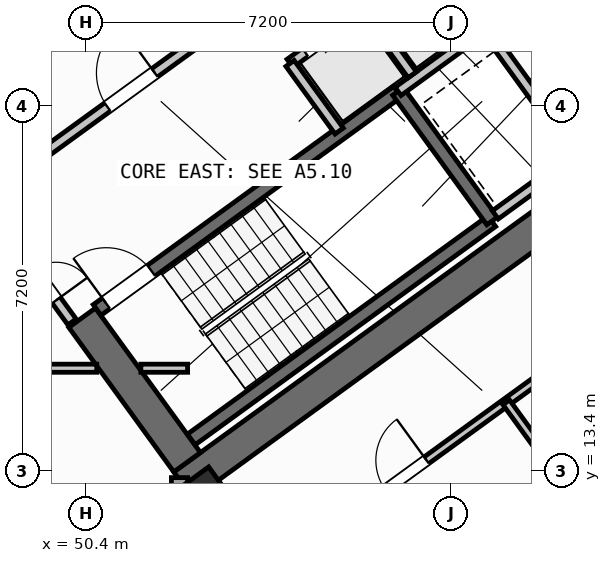
"""IFC4 building model, lengths in metres.
Left out: names, types, materials, properties, quantities, classifications, styles, units other than length and angle.
Written with IfcOpenShell. Run it as: python <this file> out.ifc"""

import sys

from ifc_helpers import new_model, si_unit, direction, frame, frame_2d, origin, origin_2d, place, context, subcontext, project, spatial, rectangle, hollow_rectangle, extrude, source, transform, mapped, element, fill, save


model = new_model("IFC4")
c1 = context("Model", 3, precision=1e-05, world=origin(), true_north=direction((0.0, 1.0)))
c2 = subcontext(c1, "Body", "Model", "MODEL_VIEW")
j1 = project(units=[si_unit("LENGTHUNIT", "METRE"), si_unit("PLANEANGLEUNIT", "RADIAN")], contexts=[c1])
p1 = place(None, origin())
s1 = spatial("IfcSite", under=j1, at=p1, CompositionType="ELEMENT")
p2 = place(p1, origin())
s2 = spatial("IfcBuilding", under=s1, at=p2, CompositionType="ELEMENT")
p3 = place(p2, frame((0.0, 0.0, 60.0)))
s3 = spatial("IfcBuildingStorey", under=s2, at=p3, CompositionType="ELEMENT", Elevation=60.0)
p4 = place(p3, frame((52.318, 13.11, 0.0), z_axis=(0.0, 0.0, 1.0), x_axis=(0.809019445368, 0.587781878776, 0.0)))
e1 = element("IfcWall", 1, at=p4, inside=s3, PredefinedType="SHEAR", context=c2, shape_type="SweptSolid", body=[
    extrude(rectangle(XDim=12.44, YDim=0.65, at=frame_2d((6.22, 0.0))), origin(), (0.0, 0.0, 1.0), 3.35),
])
p5 = place(p3, frame((52.39, 13.564, 0.0), z_axis=(0.0, 0.0, 1.0), x_axis=(-0.58779688989, 0.809008539037, 0.0)))
e2 = element("IfcWall", 2, at=p5, inside=s3, PredefinedType="SHEAR", context=c2, shape_type="SweptSolid", body=[
    extrude(rectangle(XDim=3.525, YDim=0.65, at=frame_2d((1.763, 0.0))), origin(), (0.0, 0.0, 1.0), 3.35),
])
m1 = source(origin(), c2, "Body", "SweptSolid", [
    extrude(hollow_rectangle(XDim=1.0, YDim=1.0, WallThickness=0.04, at=origin_2d()), origin(), (0.0, 0.0, 1.0), 3.6),
])
p6 = place(p3, frame((52.705, 12.773, 0.0), z_axis=(0.0, 0.0, 1.0), x_axis=(0.809016994375, 0.587785252292, 0.0)))
e3 = element("IfcColumn", 3, at=p6, inside=s3, PredefinedType="COLUMN", context=c2, shape_type="MappedRepresentation", body=[
    mapped(m1, transform((0.0, 0.0, 0.0), scale=1.0)),
])
p7 = place(p3, frame((58.455, 35.484, 0.0), z_axis=(0.0, 0.0, 1.0), x_axis=(0.587783625747, -0.809018176127, 0.0)))
e4 = element("IfcWall", 4, at=p7, inside=s3, PredefinedType="STANDARD", context=c2, shape_type="SweptSolid", body=[
    extrude(rectangle(XDim=21.587, YDim=0.32, at=frame_2d((10.794, 0.0))), origin(), (0.0, 0.0, 1.0), 2.725),
])
p8 = place(p7, frame((1.54, 0.0, 0.85)))
e5 = element("IfcOpeningElement", 5, at=p8, cuts=e4, PredefinedType="OPENING", context=c2, shape_type="SweptSolid", body=[
    extrude(rectangle(XDim=1.5, YDim=1.5, at=frame_2d((0.75, 0.75))), frame((0.0, 0.17, 0.0), z_axis=(0.0, -1.0, 0.0), x_axis=(1.0, 0.0, 0.0)), (0.0, 0.0, 1.0), 0.34),
])
p9 = place(p7, frame((4.695, 0.0, 0.85)))
e6 = element("IfcOpeningElement", 6, at=p9, cuts=e4, PredefinedType="OPENING", context=c2, shape_type="SweptSolid", body=[
    extrude(rectangle(XDim=1.8, YDim=1.5, at=frame_2d((0.9, 0.75))), frame((0.0, 0.17, 0.0), z_axis=(0.0, -1.0, 0.0), x_axis=(1.0, 0.0, 0.0)), (0.0, 0.0, 1.0), 0.34),
])
p10 = place(p7, frame((13.009, 0.0, 1.0)))
e7 = element("IfcOpeningElement", 7, at=p10, cuts=e4, PredefinedType="OPENING", context=c2, shape_type="SweptSolid", body=[
    extrude(rectangle(XDim=0.9, YDim=1.25, at=frame_2d((0.45, 0.625))), frame((0.0, 0.17, 0.0), z_axis=(0.0, -1.0, 0.0), x_axis=(1.0, 0.0, 0.0)), (0.0, 0.0, 1.0), 0.34),
])
p11 = place(p7, frame((16.092, 0.0, 0.95)))
e8 = element("IfcOpeningElement", 8, at=p11, cuts=e4, PredefinedType="OPENING", context=c2, shape_type="SweptSolid", body=[
    extrude(rectangle(XDim=1.2, YDim=1.4, at=frame_2d((0.6, 0.7))), frame((0.0, 0.17, 0.0), z_axis=(0.0, -1.0, 0.0), x_axis=(1.0, 0.0, 0.0)), (0.0, 0.0, 1.0), 0.34),
])
p12 = place(p7, frame((19.085, 0.0, 1.0)))
e9 = element("IfcOpeningElement", 9, at=p12, cuts=e4, PredefinedType="OPENING", context=c2, shape_type="SweptSolid", body=[
    extrude(rectangle(XDim=0.9, YDim=1.25, at=frame_2d((0.45, 0.625))), frame((0.0, 0.17, 0.0), z_axis=(0.0, -1.0, 0.0), x_axis=(1.0, 0.0, 0.0)), (0.0, 0.0, 1.0), 0.34),
])
p13 = place(p3, frame((71.098, 17.731, 0.0), z_axis=(0.0, 0.0, 1.0), x_axis=(-0.809021120468, -0.587779573171, 0.0)))
e10 = element("IfcWall", 10, at=p13, inside=s3, PredefinedType="STANDARD", context=c2, shape_type="SweptSolid", body=[
    extrude(rectangle(XDim=17.588, YDim=0.32, at=frame_2d((8.794, 0.0))), origin(), (0.0, 0.0, 1.0), 3.35),
])
p14 = place(p13, frame((1.624, 0.0, 0.0)))
e11 = element("IfcOpeningElement", 11, at=p14, cuts=e10, PredefinedType="OPENING", context=c2, shape_type="SweptSolid", body=[
    extrude(rectangle(XDim=1.05, YDim=2.15, at=frame_2d((0.525, 1.075))), frame((0.0, 0.17, 0.0), z_axis=(0.0, -1.0, 0.0), x_axis=(1.0, 0.0, 0.0)), (0.0, 0.0, 1.0), 0.34),
])
p15 = place(p13, frame((4.104, 0.0, 1.0)))
e12 = element("IfcOpeningElement", 12, at=p15, cuts=e10, PredefinedType="OPENING", context=c2, shape_type="SweptSolid", body=[
    extrude(rectangle(XDim=0.9, YDim=1.25, at=frame_2d((0.45, 0.625))), frame((0.0, 0.17, 0.0), z_axis=(0.0, -1.0, 0.0), x_axis=(1.0, 0.0, 0.0)), (0.0, 0.0, 1.0), 0.34),
])
p16 = place(p13, frame((7.879, 0.0, 0.85)))
e13 = element("IfcOpeningElement", 13, at=p16, cuts=e10, PredefinedType="OPENING", context=c2, shape_type="SweptSolid", body=[
    extrude(rectangle(XDim=1.8, YDim=1.5, at=frame_2d((0.9, 0.75))), frame((0.0, 0.17, 0.0), z_axis=(0.0, -1.0, 0.0), x_axis=(1.0, 0.0, 0.0)), (0.0, 0.0, 1.0), 0.34),
])
p17 = place(p13, frame((13.529, 0.0, 0.85)))
e14 = element("IfcOpeningElement", 14, at=p17, cuts=e10, PredefinedType="OPENING", context=c2, shape_type="SweptSolid", body=[
    extrude(rectangle(XDim=1.5, YDim=1.5, at=frame_2d((0.75, 0.75))), frame((0.0, 0.17, 0.0), z_axis=(0.0, -1.0, 0.0), x_axis=(1.0, 0.0, 0.0)), (0.0, 0.0, 1.0), 0.34),
])
p18 = place(p3, frame((52.24, 13.261, 0.0), z_axis=(0.0, 0.0, 1.0), x_axis=(0.0, -1.0, 0.0)))
e15 = element("IfcWall", 15, at=p18, inside=s3, PredefinedType="STANDARD", context=c2, shape_type="SweptSolid", body=[
    extrude(rectangle(XDim=9.795, YDim=0.32, at=frame_2d((4.897, 0.0))), origin(), (0.0, 0.0, 1.0), 3.35),
])
p19 = place(p18, frame((2.199, 0.0, 0.8)))
e16 = element("IfcOpeningElement", 16, at=p19, cuts=e15, PredefinedType="OPENING", context=c2, shape_type="SweptSolid", body=[
    extrude(rectangle(XDim=2.1, YDim=1.55, at=frame_2d((1.05, 0.775))), frame((0.0, 0.17, 0.0), z_axis=(0.0, -1.0, 0.0), x_axis=(1.0, 0.0, 0.0)), (0.0, 0.0, 1.0), 0.34),
])
p20 = place(p18, frame((6.88, 0.0, 0.85)))
e17 = element("IfcOpeningElement", 17, at=p20, cuts=e15, PredefinedType="OPENING", context=c2, shape_type="SweptSolid", body=[
    extrude(rectangle(XDim=1.8, YDim=1.5, at=frame_2d((0.9, 0.75))), frame((0.0, 0.17, 0.0), z_axis=(0.0, -1.0, 0.0), x_axis=(1.0, 0.0, 0.0)), (0.0, 0.0, 1.0), 0.34),
])
p21 = place(p3, frame((52.472, 14.013, 0.0), z_axis=(0.0, 0.0, 1.0), x_axis=(0.809028366311, 0.587769599847, 0.0)))
e18 = element("IfcWall", 18, at=p21, inside=s3, PredefinedType="SHEAR", context=c2, shape_type="SweptSolid", body=[
    extrude(rectangle(XDim=7.33, YDim=0.26, at=frame_2d((3.665, 0.0))), origin(), (0.0, 0.0, 1.0), 3.35),
])
p22 = place(p3, frame((50.615, 16.57, 0.0), z_axis=(0.0, 0.0, 1.0), x_axis=(0.809028366311, 0.587769599847, 0.0)))
e19 = element("IfcWall", 19, at=p22, inside=s3, PredefinedType="SHEAR", context=c2, shape_type="SweptSolid", body=[
    extrude(rectangle(XDim=7.33, YDim=0.26, at=frame_2d((3.665, 0.0))), origin(), (0.0, 0.0, 1.0), 3.35),
])
p23 = place(p22, frame((0.22, 0.0, 0.0)))
e20 = element("IfcOpeningElement", 20, at=p23, cuts=e19, PredefinedType="OPENING", context=c2, shape_type="SweptSolid", body=[
    extrude(rectangle(XDim=1.1, YDim=2.1, at=frame_2d((0.55, 1.05))), frame((0.0, 0.14, 0.0), z_axis=(0.0, -1.0, 0.0), x_axis=(1.0, 0.0, 0.0)), (0.0, 0.0, 1.0), 0.28),
])
p24 = place(p3, frame((58.41, 18.327, 0.0), z_axis=(0.0, 0.0, 1.0), x_axis=(-0.58776738483, 0.809029975545, 0.0)))
e21 = element("IfcWall", 21, at=p24, inside=s3, PredefinedType="SHEAR", context=c2, shape_type="SweptSolid", body=[
    extrude(rectangle(XDim=3.16, YDim=0.26, at=frame_2d((1.58, 0.0))), origin(), (0.0, 0.0, 1.0), 3.35),
])
p25 = place(p3, frame((47.106, 21.437, 0.0), z_axis=(0.0, 0.0, 1.0), x_axis=(0.809012514015, 0.58779141893, 0.0)))
e22 = element("IfcWall", 22, at=p25, inside=s3, PredefinedType="STANDARD", context=c2, shape_type="SweptSolid", body=[
    extrude(rectangle(XDim=3.398, YDim=0.2, at=frame_2d((1.699, 0.0))), origin(), (0.0, 0.0, 1.0), 3.34),
])
p26 = place(p25, frame((0.408, 0.0, 0.0)))
e23 = element("IfcOpeningElement", 23, at=p26, cuts=e22, PredefinedType="OPENING", context=c2, shape_type="SweptSolid", body=[
    extrude(rectangle(XDim=1.3, YDim=2.2, at=frame_2d((0.65, 1.1))), frame((0.0, 0.11, 0.0), z_axis=(0.0, -1.0, 0.0), x_axis=(1.0, 0.0, 0.0)), (0.0, 0.0, 1.0), 0.22),
])
p27 = place(p3, frame((48.799, 19.107, 0.0), z_axis=(0.0, 0.0, 1.0), x_axis=(0.809012959416, 0.587790805897, 0.0)))
e24 = element("IfcWall", 24, at=p27, inside=s3, PredefinedType="STANDARD", context=c2, shape_type="SweptSolid", body=[
    extrude(rectangle(XDim=5.718, YDim=0.2, at=frame_2d((2.859, 0.0))), origin(), (0.0, 0.0, 1.0), 3.34),
])
p28 = place(p27, frame((2.498, 0.0, 0.0)))
e25 = element("IfcOpeningElement", 25, at=p28, cuts=e24, PredefinedType="OPENING", context=c2, shape_type="SweptSolid", body=[
    extrude(rectangle(XDim=1.15, YDim=2.1, at=frame_2d((0.575, 1.05))), frame((0.0, 0.11, 0.0), z_axis=(0.0, -1.0, 0.0), x_axis=(1.0, 0.0, 0.0)), (0.0, 0.0, 1.0), 0.22),
])
p29 = place(p3, frame((56.553, 20.884, 0.0), z_axis=(0.0, 0.0, 1.0), x_axis=(0.809035789462, 0.587759382205, 0.0)))
e26 = element("IfcWall", 26, at=p29, inside=s3, PredefinedType="STANDARD", context=c2, shape_type="SweptSolid", body=[
    extrude(rectangle(XDim=3.768, YDim=0.2, at=frame_2d((1.884, 0.0))), origin(), (0.0, 0.0, 1.0), 3.34),
])
p30 = place(p29, frame((2.65, 0.0, 0.0)))
e27 = element("IfcOpeningElement", 27, at=p30, cuts=e26, PredefinedType="OPENING", context=c2, shape_type="SweptSolid", body=[
    extrude(rectangle(XDim=0.86, YDim=2.05, at=frame_2d((0.43, 1.025))), frame((0.0, 0.11, 0.0), z_axis=(0.0, -1.0, 0.0), x_axis=(1.0, 0.0, 0.0)), (0.0, 0.0, 1.0), 0.22),
])
p31 = place(p3, frame((54.421, 21.436, 0.0), z_axis=(0.0, 0.0, 1.0), x_axis=(0.809013710463, 0.587789772183, 0.0)))
e28 = element("IfcWall", 28, at=p31, inside=s3, PredefinedType="STANDARD", context=c2, shape_type="SweptSolid", body=[
    extrude(rectangle(XDim=5.36, YDim=0.2, at=frame_2d((2.68, 0.0))), origin(), (0.0, 0.0, 1.0), 3.34),
])
p32 = place(p31, frame((0.37, 0.0, 0.0)))
e29 = element("IfcOpeningElement", 29, at=p32, cuts=e28, PredefinedType="OPENING", context=c2, shape_type="SweptSolid", body=[
    extrude(rectangle(XDim=1.1, YDim=2.15, at=frame_2d((0.55, 1.075))), frame((0.0, 0.11, 0.0), z_axis=(0.0, -1.0, 0.0), x_axis=(1.0, 0.0, 0.0)), (0.0, 0.0, 1.0), 0.22),
])
p33 = place(p31, frame((2.17, 0.0, 0.0)))
e30 = element("IfcOpeningElement", 30, at=p33, cuts=e28, PredefinedType="OPENING", context=c2, shape_type="SweptSolid", body=[
    extrude(rectangle(XDim=1.1, YDim=2.15, at=frame_2d((0.55, 1.075))), frame((0.0, 0.11, 0.0), z_axis=(0.0, -1.0, 0.0), x_axis=(1.0, 0.0, 0.0)), (0.0, 0.0, 1.0), 0.22),
])
p34 = place(p31, frame((3.97, 0.0, 0.0)))
e31 = element("IfcOpeningElement", 31, at=p34, cuts=e28, PredefinedType="OPENING", context=c2, shape_type="SweptSolid", body=[
    extrude(rectangle(XDim=1.1, YDim=2.15, at=frame_2d((0.55, 1.075))), frame((0.0, 0.11, 0.0), z_axis=(0.0, -1.0, 0.0), x_axis=(1.0, 0.0, 0.0)), (0.0, 0.0, 1.0), 0.22),
])
p35 = place(p3, frame((55.391, 20.102, 0.0), z_axis=(0.0, 0.0, 1.0), x_axis=(-0.58778447739, 0.809017557374, 0.0)))
e32 = element("IfcWall", 32, at=p35, inside=s3, PredefinedType="STANDARD", context=c2, shape_type="SweptSolid", body=[
    extrude(rectangle(XDim=1.65, YDim=0.2, at=frame_2d((0.825, 0.0))), origin(), (0.0, 0.0, 1.0), 3.34),
])
p36 = place(p3, frame((56.834, 21.212, 0.0), z_axis=(0.0, 0.0, 1.0), x_axis=(-0.58776738483, 0.809029975545, 0.0)))
e33 = element("IfcWall", 33, at=p36, inside=s3, PredefinedType="STANDARD", context=c2, shape_type="SweptSolid", body=[
    extrude(rectangle(XDim=1.58, YDim=0.2, at=frame_2d((0.79, 0.0))), origin(), (0.0, 0.0, 1.0), 3.34),
])
p37 = place(p3, frame((60.067, 19.655, 0.0), z_axis=(0.0, 0.0, 1.0), x_axis=(-0.587800520745, 0.809005900975, 0.0)))
e34 = element("IfcWall", 34, at=p37, inside=s3, PredefinedType="STANDARD", context=c2, shape_type="SweptSolid", body=[
    extrude(rectangle(XDim=2.66, YDim=0.2, at=frame_2d((1.33, 0.0))), origin(), (0.0, 0.0, 1.0), 3.34),
])
p38 = place(p3, frame((58.472, 18.447, 0.0), z_axis=(0.0, 0.0, 1.0), x_axis=(0.809022487728, 0.587777691266, 0.0)))
e35 = element("IfcWall", 35, at=p38, inside=s3, PredefinedType="STANDARD", context=c2, shape_type="SweptSolid", body=[
    extrude(rectangle(XDim=3.648, YDim=0.2, at=frame_2d((1.824, 0.0))), origin(), (0.0, 0.0, 1.0), 3.34),
])
p39 = place(p3, frame((35.296, 15.42, 0.0), z_axis=(0.0, 0.0, 1.0), x_axis=(1.0, 0.0, 0.0)))
e36 = element("IfcWall", 36, at=p39, inside=s3, PredefinedType="PARTITIONING", context=c2, shape_type="SweptSolid", body=[
    extrude(rectangle(XDim=15.311, YDim=0.16, at=frame_2d((7.655, 0.0))), origin(), (0.0, 0.0, 1.0), 3.34),
])
p40 = place(p39, frame((0.91, 0.0, 0.0)))
e37 = element("IfcOpeningElement", 37, at=p40, cuts=e36, PredefinedType="OPENING", context=c2, shape_type="SweptSolid", body=[
    extrude(rectangle(XDim=1.0, YDim=2.1, at=frame_2d((0.5, 1.05))), frame((0.0, 0.09, 0.0), z_axis=(0.0, -1.0, 0.0), x_axis=(1.0, 0.0, 0.0)), (0.0, 0.0, 1.0), 0.18),
])
p41 = place(p39, frame((8.74, 0.0, 0.0)))
e38 = element("IfcOpeningElement", 38, at=p41, cuts=e36, PredefinedType="OPENING", context=c2, shape_type="SweptSolid", body=[
    extrude(rectangle(XDim=1.0, YDim=2.1, at=frame_2d((0.5, 1.05))), frame((0.0, 0.09, 0.0), z_axis=(0.0, -1.0, 0.0), x_axis=(1.0, 0.0, 0.0)), (0.0, 0.0, 1.0), 0.18),
])
p42 = place(p3, frame((51.477, 15.42, 0.0), z_axis=(0.0, 0.0, 1.0), x_axis=(1.0, 0.0, 0.0)))
e39 = element("IfcWall", 39, at=p42, inside=s3, PredefinedType="PARTITIONING", context=c2, shape_type="SweptSolid", body=[
    extrude(rectangle(XDim=0.923, YDim=0.16, at=frame_2d((0.461, 0.0))), origin(), (0.0, 0.0, 1.0), 3.34),
])
p43 = place(p3, frame((50.119, 16.333, 0.0), z_axis=(0.0, 0.0, 1.0), x_axis=(-0.587749856981, 0.809042709391, 0.0)))
e40 = element("IfcWall", 40, at=p43, inside=s3, PredefinedType="STANDARD", context=c2, shape_type="SweptSolid", body=[
    extrude(rectangle(XDim=2.96, YDim=0.2, at=frame_2d((1.48, 0.0))), origin(), (0.0, 0.0, 1.0), 3.34),
])
p44 = place(p43, frame((0.53, 0.0, 0.0)))
e41 = element("IfcOpeningElement", 41, at=p44, cuts=e40, PredefinedType="OPENING", context=c2, shape_type="SweptSolid", body=[
    extrude(rectangle(XDim=1.5, YDim=2.15, at=frame_2d((0.75, 1.075))), frame((0.0, 0.11, 0.0), z_axis=(0.0, -1.0, 0.0), x_axis=(1.0, 0.0, 0.0)), (0.0, 0.0, 1.0), 0.22),
])
p45 = place(p3, frame((53.705, 11.126, 0.0), z_axis=(0.0, 0.0, 1.0), x_axis=(0.809014504436, 0.587788679384, 0.0)))
e42 = element("IfcWall", 42, at=p45, inside=s3, PredefinedType="PARTITIONING", context=c2, shape_type="SweptSolid", body=[
    extrude(rectangle(XDim=14.67, YDim=0.16, at=frame_2d((7.335, 0.0))), origin(), (0.0, 0.0, 1.0), 3.34),
])
p46 = place(p45, frame((3.215, 0.0, 0.0)))
e43 = element("IfcOpeningElement", 43, at=p46, cuts=e42, PredefinedType="OPENING", context=c2, shape_type="SweptSolid", body=[
    extrude(rectangle(XDim=1.0, YDim=2.1, at=frame_2d((0.5, 1.05))), frame((0.0, 0.09, 0.0), z_axis=(0.0, -1.0, 0.0), x_axis=(1.0, 0.0, 0.0)), (0.0, 0.0, 1.0), 0.18),
])
p47 = place(p45, frame((9.915, 0.0, 0.0)))
e44 = element("IfcOpeningElement", 44, at=p47, cuts=e42, PredefinedType="OPENING", context=c2, shape_type="SweptSolid", body=[
    extrude(rectangle(XDim=1.0, YDim=2.1, at=frame_2d((0.5, 1.05))), frame((0.0, 0.09, 0.0), z_axis=(0.0, -1.0, 0.0), x_axis=(1.0, 0.0, 0.0)), (0.0, 0.0, 1.0), 0.18),
])
p48 = place(p3, frame((61.539, 10.823, 0.0), z_axis=(0.0, 0.0, 1.0), x_axis=(-0.587785532001, 0.809016791155, 0.0)))
e45 = element("IfcWall", 45, at=p48, inside=s3, PredefinedType="PARTITIONING", context=c2, shape_type="SweptSolid", body=[
    extrude(rectangle(XDim=4.85, YDim=0.16, at=frame_2d((2.425, 0.0))), origin(), (0.0, 0.0, 1.0), 3.34),
])
m2 = source(origin(), c2, "Body", "SweptSolid", [
    extrude(rectangle(XDim=1.1, YDim=2.1, at=frame_2d((0.55, 1.05))), frame((0.0, 0.025, 0.0), z_axis=(0.0, -1.0, 0.0), x_axis=(1.0, 0.0, 0.0)), (0.0, 0.0, 1.0), 0.05),
])
p49 = place(p23, origin())
e46 = element("IfcDoor", 46, at=p49, inside=s3, OperationType="SINGLE_SWING_LEFT", PredefinedType="DOOR", context=c2, shape_type="MappedRepresentation", body=[
    mapped(m2, transform((0.0, 0.0, 0.0), scale=1.0)),
])
fill(e20, e46)
m3 = source(origin(), c2, "Body", "SweptSolid", [
    extrude(rectangle(XDim=1.15, YDim=2.1, at=frame_2d((0.575, 1.05))), frame((0.0, 0.025, 0.0), z_axis=(0.0, -1.0, 0.0), x_axis=(1.0, 0.0, 0.0)), (0.0, 0.0, 1.0), 0.05),
])
p50 = place(p28, origin())
e47 = element("IfcDoor", 47, at=p50, inside=s3, OperationType="SINGLE_SWING_RIGHT", PredefinedType="DOOR", context=c2, shape_type="MappedRepresentation", body=[
    mapped(m3, transform((0.0, 0.0, 0.0), scale=1.0)),
])
fill(e25, e47)
m4 = source(origin(), c2, "Body", "SweptSolid", [
    extrude(rectangle(XDim=1.1, YDim=2.15, at=frame_2d((0.55, 1.075))), frame((0.0, 0.025, 0.0), z_axis=(0.0, -1.0, 0.0), x_axis=(1.0, 0.0, 0.0)), (0.0, 0.0, 1.0), 0.05),
])
p51 = place(p32, origin())
e48 = element("IfcDoor", 48, at=p51, inside=s3, OperationType="DOUBLE_DOOR_SLIDING", PredefinedType="DOOR", context=c2, shape_type="MappedRepresentation", body=[
    mapped(m4, transform((0.0, 0.0, 0.0), scale=1.0)),
])
fill(e29, e48)
m5 = source(origin(), c2, "Body", "SweptSolid", [
    extrude(rectangle(XDim=1.5, YDim=2.15, at=frame_2d((0.75, 1.075))), frame((0.0, 0.025, 0.0), z_axis=(0.0, -1.0, 0.0), x_axis=(1.0, 0.0, 0.0)), (0.0, 0.0, 1.0), 0.05),
])
p52 = place(p44, frame((1.5, 0.0, 0.0), z_axis=(0.0, 0.0, 1.0), x_axis=(-1.0, 0.0, 0.0)))
e49 = element("IfcDoor", 49, at=p52, inside=s3, OperationType="DOUBLE_DOOR_SINGLE_SWING", PredefinedType="DOOR", context=c2, shape_type="MappedRepresentation", body=[
    mapped(m5, transform((0.0, 0.0, 0.0), scale=1.0)),
])
fill(e41, e49)
m6 = source(origin(), c2, "Body", "SweptSolid", [
    extrude(rectangle(XDim=1.0, YDim=2.1, at=frame_2d((0.5, 1.05))), frame((0.0, 0.025, 0.0), z_axis=(0.0, -1.0, 0.0), x_axis=(1.0, 0.0, 0.0)), (0.0, 0.0, 1.0), 0.05),
])
p53 = place(p46, origin())
e50 = element("IfcDoor", 50, at=p53, inside=s3, OperationType="SINGLE_SWING_RIGHT", PredefinedType="DOOR", context=c2, shape_type="MappedRepresentation", body=[
    mapped(m6, transform((0.0, 0.0, 0.0), scale=1.0)),
])
fill(e43, e50)
save(model, sys.argv[1])
